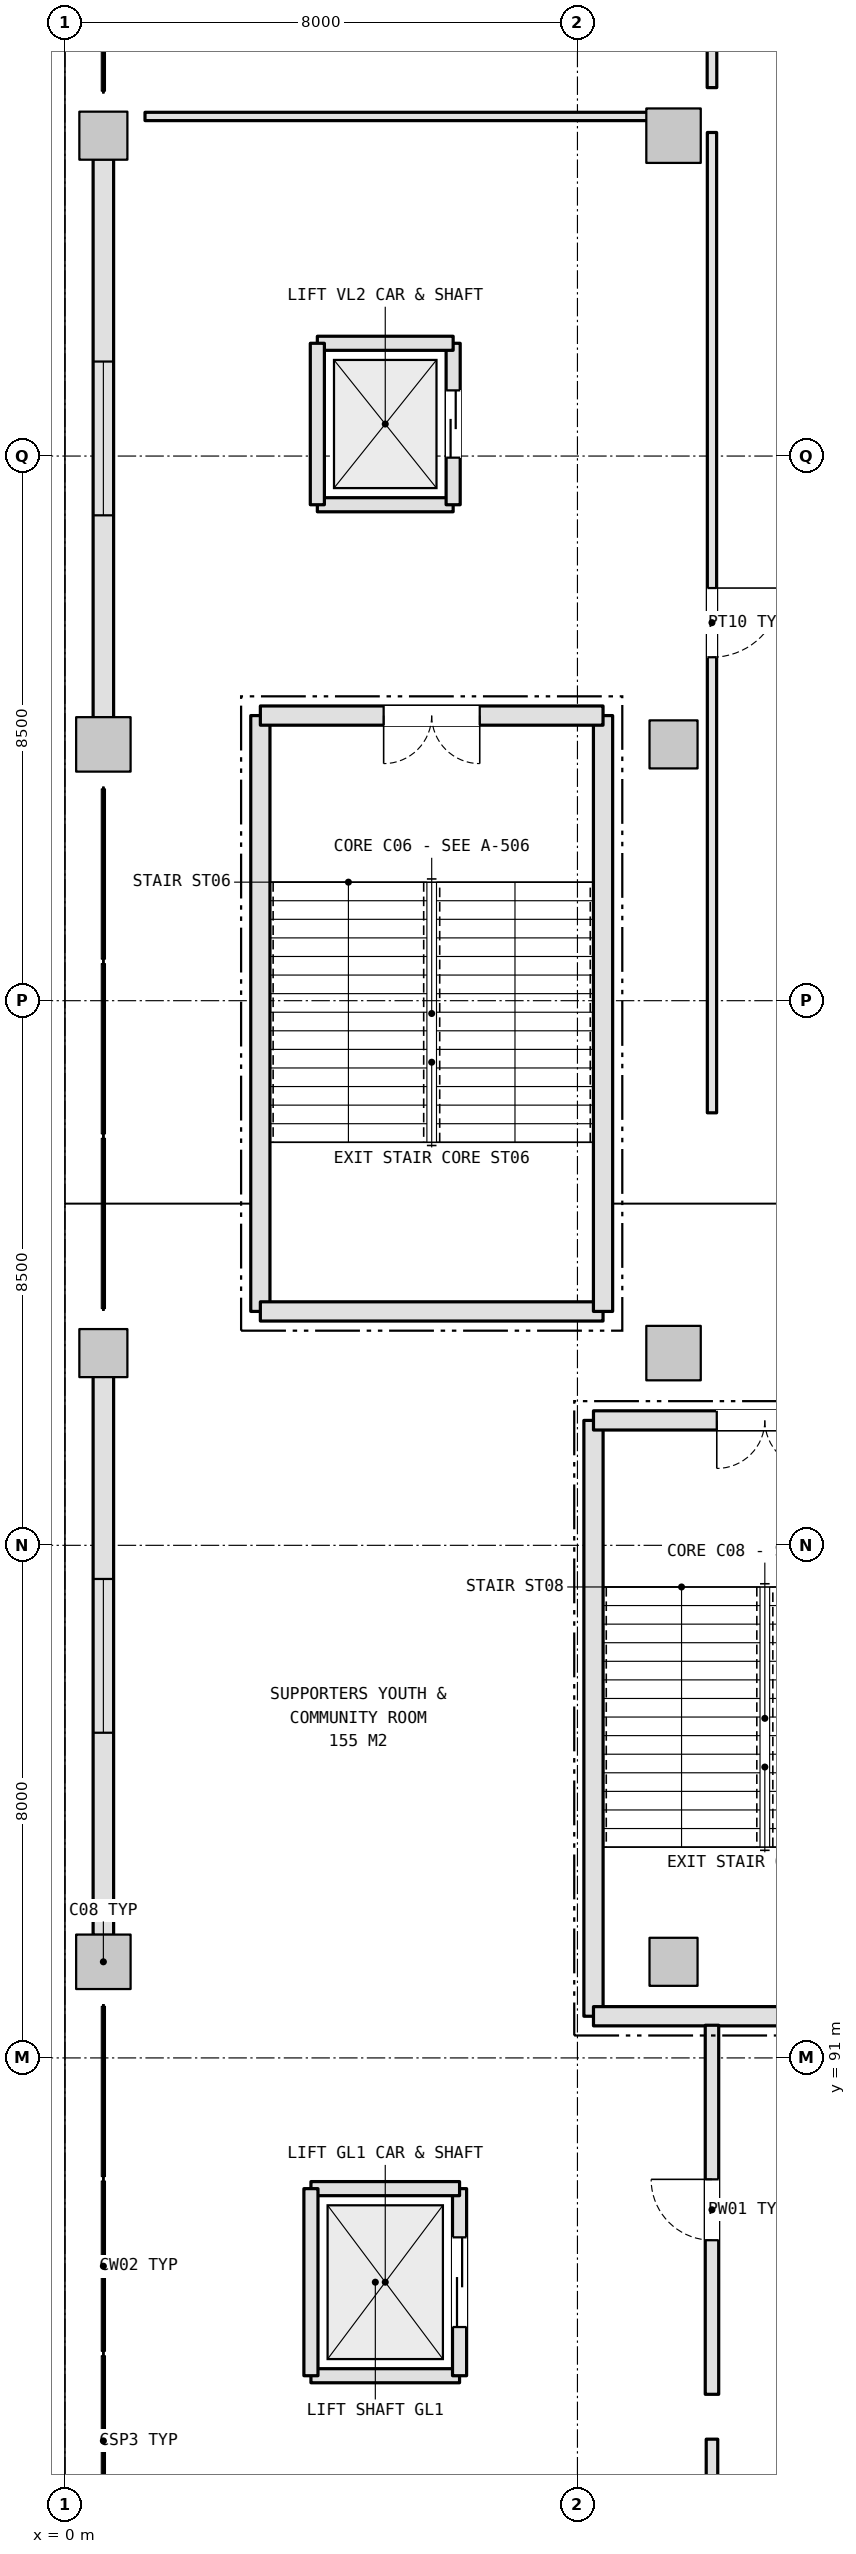
"""IFC4 building model, lengths in metres.
Left out: names, types, materials, properties, quantities, classifications, styles, units other than length and angle.
Written with IfcOpenShell. Run it as: python <this file> out.ifc"""

import sys

from ifc_helpers import new_model, si_unit, direction, frame, frame_2d, origin, origin_2d, place, context, subcontext, project, spatial, rectangle, extrude, element, fill, save


model = new_model("IFC4")
c1 = context("Model", 3, precision=1e-05, world=origin(), true_north=direction((0.0, 1.0)))
c2 = subcontext(c1, "Body", "Model", "MODEL_VIEW")
j1 = project(units=[si_unit("LENGTHUNIT", "METRE"), si_unit("PLANEANGLEUNIT", "RADIAN")], contexts=[c1])
p1 = place(None, origin())
s1 = spatial("IfcSite", under=j1, at=p1, CompositionType="ELEMENT")
p2 = place(p1, origin())
s2 = spatial("IfcBuilding", under=s1, at=p2, CompositionType="ELEMENT")
p3 = place(p2, frame((0.0, 0.0, 5.4)))
s3 = spatial("IfcBuildingStorey", under=s2, at=p3, CompositionType="ELEMENT", Elevation=5.4)
p4 = place(p3, frame((0.6, 92.5, 0.0), z_axis=(0.0, 0.0, 1.0), x_axis=(1.0, 0.0, 0.0)))
e1 = element("IfcColumn", 1, at=p4, inside=s3, PredefinedType="COLUMN", context=c2, shape_type="SweptSolid", body=[
    extrude(rectangle(XDim=0.85, YDim=0.85, at=origin_2d()), origin(), (0.0, 0.0, 1.0), 5.4),
])
p5 = place(p3, frame((0.6, 102.0, 0.0), z_axis=(0.0, 0.0, 1.0), x_axis=(1.0, 0.0, 0.0)))
e2 = element("IfcColumn", 2, at=p5, inside=s3, PredefinedType="COLUMN", context=c2, shape_type="SweptSolid", body=[
    extrude(rectangle(XDim=0.75, YDim=0.75, at=origin_2d()), origin(), (0.0, 0.0, 1.0), 5.4),
])
p6 = place(p3, frame((0.6, 111.5, 0.0), z_axis=(0.0, 0.0, 1.0), x_axis=(1.0, 0.0, 0.0)))
e3 = element("IfcColumn", 3, at=p6, inside=s3, PredefinedType="COLUMN", context=c2, shape_type="SweptSolid", body=[
    extrude(rectangle(XDim=0.85, YDim=0.85, at=origin_2d()), origin(), (0.0, 0.0, 1.0), 5.4),
])
for number, where, z_axis, x_axis in (
    (4, (0.6, 121.0, 0.0), (0.0, 0.0, 1.0), (1.0, 0.0, 0.0)),
    (5, (9.5, 92.5, 0.0), (0.0, 0.0, 1.0), (1.0, 0.0, 0.0)),
):
    element("IfcColumn", number, at=place(p3, frame(where, z_axis=z_axis, x_axis=x_axis)), inside=s3, PredefinedType="COLUMN", context=c2, shape_type="SweptSolid", body=[
        extrude(rectangle(XDim=0.75, YDim=0.75, at=origin_2d()), origin(), (0.0, 0.0, 1.0), 5.4),
    ])
p7 = place(p3, frame((9.5, 102.0, 0.0), z_axis=(0.0, 0.0, 1.0), x_axis=(1.0, 0.0, 0.0)))
e6 = element("IfcColumn", 6, at=p7, inside=s3, PredefinedType="COLUMN", context=c2, shape_type="SweptSolid", body=[
    extrude(rectangle(XDim=0.85, YDim=0.85, at=origin_2d()), origin(), (0.0, 0.0, 1.0), 5.4),
])
p8 = place(p3, frame((9.5, 111.5, 0.0), z_axis=(0.0, 0.0, 1.0), x_axis=(1.0, 0.0, 0.0)))
e7 = element("IfcColumn", 7, at=p8, inside=s3, PredefinedType="COLUMN", context=c2, shape_type="SweptSolid", body=[
    extrude(rectangle(XDim=0.75, YDim=0.75, at=origin_2d()), origin(), (0.0, 0.0, 1.0), 5.4),
])
p9 = place(p3, frame((9.5, 121.0, 0.0), z_axis=(0.0, 0.0, 1.0), x_axis=(1.0, 0.0, 0.0)))
e8 = element("IfcColumn", 8, at=p9, inside=s3, PredefinedType="COLUMN", context=c2, shape_type="SweptSolid", body=[
    extrude(rectangle(XDim=0.85, YDim=0.85, at=origin_2d()), origin(), (0.0, 0.0, 1.0), 5.4),
])
p10 = place(p3, frame((0.6, 92.913, 0.0), z_axis=(0.0, 0.0, 1.0), x_axis=(0.0, 1.0, 0.0)))
e9 = element("IfcWall", 9, at=p10, inside=s3, PredefinedType="SOLIDWALL", context=c2, shape_type="SweptSolid", body=[
    extrude(rectangle(XDim=8.724, YDim=0.32, at=frame_2d((4.362, 0.0))), origin(), (0.0, 0.0, 1.0), 4.475),
])
p11 = place(p10, frame((3.162, 0.0, 1.05)))
e10 = element("IfcOpeningElement", 10, at=p11, cuts=e9, PredefinedType="OPENING", context=c2, shape_type="SweptSolid", body=[
    extrude(rectangle(XDim=2.4, YDim=2.1, at=frame_2d((1.2, 1.05))), frame((0.0, 0.17, 0.0), z_axis=(0.0, -1.0, 0.0), x_axis=(1.0, 0.0, 0.0)), (0.0, 0.0, 1.0), 0.34),
])
p12 = place(p3, frame((0.6, 111.913, 0.0), z_axis=(0.0, 0.0, 1.0), x_axis=(0.0, 1.0, 0.0)))
e11 = element("IfcWall", 11, at=p12, inside=s3, PredefinedType="SOLIDWALL", context=c2, shape_type="SweptSolid", body=[
    extrude(rectangle(XDim=8.724, YDim=0.32, at=frame_2d((4.362, 0.0))), origin(), (0.0, 0.0, 1.0), 4.475),
])
p13 = place(p12, frame((3.162, 0.0, 1.05)))
e12 = element("IfcOpeningElement", 12, at=p13, cuts=e11, PredefinedType="OPENING", context=c2, shape_type="SweptSolid", body=[
    extrude(rectangle(XDim=2.4, YDim=2.1, at=frame_2d((1.2, 1.05))), frame((0.0, 0.17, 0.0), z_axis=(0.0, -1.0, 0.0), x_axis=(1.0, 0.0, 0.0)), (0.0, 0.0, 1.0), 0.34),
])
p14 = place(p3, frame((3.05, 111.95, 0.0), z_axis=(0.0, 0.0, 1.0), x_axis=(0.0, -1.0, 0.0)))
e13 = element("IfcWall", 13, at=p14, inside=s3, PredefinedType="SHEAR", context=c2, shape_type="SweptSolid", body=[
    extrude(rectangle(XDim=9.299, YDim=0.3, at=frame_2d((4.65, 0.0))), origin(), (0.0, 0.0, 1.0), 5.14),
])
p15 = place(p3, frame((3.05, 102.65, 0.0), z_axis=(0.0, 0.0, 1.0), x_axis=(1.0, 0.0, 0.0)))
e14 = element("IfcWall", 14, at=p15, inside=s3, PredefinedType="SHEAR", context=c2, shape_type="SweptSolid", body=[
    extrude(rectangle(XDim=5.349, YDim=0.3, at=frame_2d((2.675, 0.0))), origin(), (0.0, 0.0, 1.0), 5.14),
])
p16 = place(p3, frame((8.4, 102.65, 0.0), z_axis=(0.0, 0.0, 1.0), x_axis=(0.0, 1.0, 0.0)))
e15 = element("IfcWall", 15, at=p16, inside=s3, PredefinedType="SHEAR", context=c2, shape_type="SweptSolid", body=[
    extrude(rectangle(XDim=9.299, YDim=0.3, at=frame_2d((4.65, 0.0))), origin(), (0.0, 0.0, 1.0), 5.14),
])
p17 = place(p3, frame((8.4, 111.95, 0.0), z_axis=(0.0, 0.0, 1.0), x_axis=(-1.0, 0.0, 0.0)))
e16 = element("IfcWall", 16, at=p17, inside=s3, PredefinedType="SHEAR", context=c2, shape_type="SweptSolid", body=[
    extrude(rectangle(XDim=5.349, YDim=0.3, at=frame_2d((2.675, 0.0))), origin(), (0.0, 0.0, 1.0), 5.14),
])
p18 = place(p17, frame((1.925, 0.0, 0.0)))
e17 = element("IfcOpeningElement", 17, at=p18, cuts=e16, PredefinedType="OPENING", context=c2, shape_type="SweptSolid", body=[
    extrude(rectangle(XDim=1.5, YDim=2.2, at=frame_2d((0.75, 1.1))), frame((0.0, 0.16, 0.0), z_axis=(0.0, -1.0, 0.0), x_axis=(1.0, 0.0, 0.0)), (0.0, 0.0, 1.0), 0.32),
])
p19 = place(p3, frame((8.25, 100.95, 0.0), z_axis=(0.0, 0.0, 1.0), x_axis=(0.0, -1.0, 0.0)))
e18 = element("IfcWall", 18, at=p19, inside=s3, PredefinedType="SHEAR", context=c2, shape_type="SweptSolid", body=[
    extrude(rectangle(XDim=9.299, YDim=0.3, at=frame_2d((4.65, 0.0))), origin(), (0.0, 0.0, 1.0), 5.14),
])
p20 = place(p3, frame((8.25, 91.65, 0.0), z_axis=(0.0, 0.0, 1.0), x_axis=(1.0, 0.0, 0.0)))
e19 = element("IfcWall", 19, at=p20, inside=s3, PredefinedType="SHEAR", context=c2, shape_type="SweptSolid", body=[
    extrude(rectangle(XDim=5.349, YDim=0.3, at=frame_2d((2.675, 0.0))), origin(), (0.0, 0.0, 1.0), 5.14),
])
p21 = place(p3, frame((13.6, 100.95, 0.0), z_axis=(0.0, 0.0, 1.0), x_axis=(-1.0, 0.0, 0.0)))
e20 = element("IfcWall", 20, at=p21, inside=s3, PredefinedType="SHEAR", context=c2, shape_type="SweptSolid", body=[
    extrude(rectangle(XDim=5.349, YDim=0.3, at=frame_2d((2.675, 0.0))), origin(), (0.0, 0.0, 1.0), 5.14),
])
p22 = place(p21, frame((1.925, 0.0, 0.0)))
e21 = element("IfcOpeningElement", 21, at=p22, cuts=e20, PredefinedType="OPENING", context=c2, shape_type="SweptSolid", body=[
    extrude(rectangle(XDim=1.5, YDim=2.2, at=frame_2d((0.75, 1.1))), frame((0.0, 0.16, 0.0), z_axis=(0.0, -1.0, 0.0), x_axis=(1.0, 0.0, 0.0)), (0.0, 0.0, 1.0), 0.32),
])
p23 = place(p3, frame((3.94, 115.24, 0.0), z_axis=(0.0, 0.0, 1.0), x_axis=(1.0, 0.0, 0.0)))
e22 = element("IfcWall", 22, at=p23, inside=s3, PredefinedType="SHEAR", context=c2, shape_type="SweptSolid", body=[
    extrude(rectangle(XDim=2.12, YDim=0.22, at=frame_2d((1.06, 0.0))), origin(), (0.0, 0.0, 1.0), 5.14),
])
p24 = place(p3, frame((6.06, 115.24, 0.0), z_axis=(0.0, 0.0, 1.0), x_axis=(0.0, 1.0, 0.0)))
e23 = element("IfcWall", 23, at=p24, inside=s3, PredefinedType="SHEAR", context=c2, shape_type="SweptSolid", body=[
    extrude(rectangle(XDim=2.52, YDim=0.22, at=frame_2d((1.26, 0.0))), origin(), (0.0, 0.0, 1.0), 5.14),
])
p25 = place(p24, frame((0.735, 0.0, 0.0)))
e24 = element("IfcOpeningElement", 24, at=p25, cuts=e23, PredefinedType="OPENING", context=c2, shape_type="SweptSolid", body=[
    extrude(rectangle(XDim=1.05, YDim=2.15, at=frame_2d((0.525, 1.075))), frame((0.0, 0.12, 0.0), z_axis=(0.0, -1.0, 0.0), x_axis=(1.0, 0.0, 0.0)), (0.0, 0.0, 1.0), 0.24),
])
p26 = place(p3, frame((6.06, 117.76, 0.0), z_axis=(0.0, 0.0, 1.0), x_axis=(-1.0, 0.0, 0.0)))
e25 = element("IfcWall", 25, at=p26, inside=s3, PredefinedType="SHEAR", context=c2, shape_type="SweptSolid", body=[
    extrude(rectangle(XDim=2.12, YDim=0.22, at=frame_2d((1.06, 0.0))), origin(), (0.0, 0.0, 1.0), 5.14),
])
p27 = place(p3, frame((3.94, 117.76, 0.0), z_axis=(0.0, 0.0, 1.0), x_axis=(0.0, -1.0, 0.0)))
e26 = element("IfcWall", 26, at=p27, inside=s3, PredefinedType="SHEAR", context=c2, shape_type="SweptSolid", body=[
    extrude(rectangle(XDim=2.52, YDim=0.22, at=frame_2d((1.26, 0.0))), origin(), (0.0, 0.0, 1.0), 5.14),
])
p28 = place(p3, frame((3.84, 86.04, 0.0), z_axis=(0.0, 0.0, 1.0), x_axis=(1.0, 0.0, 0.0)))
e27 = element("IfcWall", 27, at=p28, inside=s3, PredefinedType="SHEAR", context=c2, shape_type="SweptSolid", body=[
    extrude(rectangle(XDim=2.32, YDim=0.22, at=frame_2d((1.16, 0.0))), origin(), (0.0, 0.0, 1.0), 5.14),
])
p29 = place(p3, frame((6.16, 86.04, 0.0), z_axis=(0.0, 0.0, 1.0), x_axis=(0.0, 1.0, 0.0)))
e28 = element("IfcWall", 28, at=p29, inside=s3, PredefinedType="SHEAR", context=c2, shape_type="SweptSolid", body=[
    extrude(rectangle(XDim=2.92, YDim=0.22, at=frame_2d((1.46, 0.0))), origin(), (0.0, 0.0, 1.0), 5.14),
])
p30 = place(p29, frame((0.76, 0.0, 0.0)))
e29 = element("IfcOpeningElement", 29, at=p30, cuts=e28, PredefinedType="OPENING", context=c2, shape_type="SweptSolid", body=[
    extrude(rectangle(XDim=1.4, YDim=2.3, at=frame_2d((0.7, 1.15))), frame((0.0, 0.12, 0.0), z_axis=(0.0, -1.0, 0.0), x_axis=(1.0, 0.0, 0.0)), (0.0, 0.0, 1.0), 0.24),
])
p31 = place(p3, frame((6.16, 88.96, 0.0), z_axis=(0.0, 0.0, 1.0), x_axis=(-1.0, 0.0, 0.0)))
e30 = element("IfcWall", 30, at=p31, inside=s3, PredefinedType="SHEAR", context=c2, shape_type="SweptSolid", body=[
    extrude(rectangle(XDim=2.32, YDim=0.22, at=frame_2d((1.16, 0.0))), origin(), (0.0, 0.0, 1.0), 5.14),
])
p32 = place(p3, frame((3.84, 88.96, 0.0), z_axis=(0.0, 0.0, 1.0), x_axis=(0.0, -1.0, 0.0)))
e31 = element("IfcWall", 31, at=p32, inside=s3, PredefinedType="SHEAR", context=c2, shape_type="SweptSolid", body=[
    extrude(rectangle(XDim=2.92, YDim=0.22, at=frame_2d((1.46, 0.0))), origin(), (0.0, 0.0, 1.0), 5.14),
])
p33 = place(p3, frame((10.1, 85.05, 0.0), z_axis=(0.0, 0.0, 1.0), x_axis=(0.0, -1.0, 0.0)))
e32 = element("IfcWall", 32, at=p33, inside=s3, PredefinedType="PARTITIONING", context=c2, shape_type="SweptSolid", body=[
    extrude(rectangle(XDim=15.3, YDim=0.18, at=frame_2d((7.65, 0.0))), origin(), (0.0, 0.0, 1.0), 4.668),
])
p34 = place(p33, frame((7.17, 0.0, 0.0)))
e33 = element("IfcOpeningElement", 33, at=p34, cuts=e32, PredefinedType="OPENING", context=c2, shape_type="SweptSolid", body=[
    extrude(rectangle(XDim=0.96, YDim=2.15, at=frame_2d((0.48, 1.075))), frame((0.0, 0.1, 0.0), z_axis=(0.0, -1.0, 0.0), x_axis=(1.0, 0.0, 0.0)), (0.0, 0.0, 1.0), 0.2),
])
p35 = place(p3, frame((10.1, 91.51, 0.0), z_axis=(0.0, 0.0, 1.0), x_axis=(0.0, -1.0, 0.0)))
e34 = element("IfcWall", 34, at=p35, inside=s3, PredefinedType="PLUMBINGWALL", context=c2, shape_type="SweptSolid", body=[
    extrude(rectangle(XDim=5.76, YDim=0.21, at=frame_2d((2.88, 0.0))), origin(), (0.0, 0.0, 1.0), 5.12),
])
p36 = place(p35, frame((2.405, 0.0, 0.0)))
e35 = element("IfcOpeningElement", 35, at=p36, cuts=e34, PredefinedType="OPENING", context=c2, shape_type="SweptSolid", body=[
    extrude(rectangle(XDim=0.95, YDim=2.15, at=frame_2d((0.475, 1.075))), frame((0.0, 0.115, 0.0), z_axis=(0.0, -1.0, 0.0), x_axis=(1.0, 0.0, 0.0)), (0.0, 0.0, 1.0), 0.23),
])
p37 = place(p3, frame((10.1, 121.05, 0.0), z_axis=(0.0, 0.0, 1.0), x_axis=(0.0, -1.0, 0.0)))
e36 = element("IfcWall", 36, at=p37, inside=s3, PredefinedType="PARTITIONING", context=c2, shape_type="SweptSolid", body=[
    extrude(rectangle(XDim=15.3, YDim=0.145, at=frame_2d((7.65, 0.0))), origin(), (0.0, 0.0, 1.0), 4.668),
])
p38 = place(p37, frame((7.11, 0.0, 0.0)))
e37 = element("IfcOpeningElement", 37, at=p38, cuts=e36, PredefinedType="OPENING", context=c2, shape_type="SweptSolid", body=[
    extrude(rectangle(XDim=1.08, YDim=2.25, at=frame_2d((0.54, 1.125))), frame((0.0, 0.083, 0.0), z_axis=(0.0, -1.0, 0.0), x_axis=(1.0, 0.0, 0.0)), (0.0, 0.0, 1.0), 0.165),
])
p39 = place(p3, frame((1.25, 121.3, 0.0), z_axis=(0.0, 0.0, 1.0), x_axis=(1.0, 0.0, 0.0)))
e38 = element("IfcWall", 38, at=p39, inside=s3, PredefinedType="PARTITIONING", context=c2, shape_type="SweptSolid", body=[
    extrude(rectangle(XDim=8.4, YDim=0.13, at=frame_2d((4.2, 0.0))), origin(), (0.0, 0.0, 1.0), 4.475),
])
p40 = place(p3, frame((10.1, 130.05, 0.0), z_axis=(0.0, 0.0, 1.0), x_axis=(0.0, -1.0, 0.0)))
e39 = element("IfcWall", 39, at=p40, inside=s3, PredefinedType="PARTITIONING", context=c2, shape_type="SweptSolid", body=[
    extrude(rectangle(XDim=8.3, YDim=0.15, at=frame_2d((4.15, 0.0))), origin(), (0.0, 0.0, 1.0), 4.668),
])
p41 = place(p40, frame((2.175, 0.0, 0.0)))
e40 = element("IfcOpeningElement", 40, at=p41, cuts=e39, PredefinedType="OPENING", context=c2, shape_type="SweptSolid", body=[
    extrude(rectangle(XDim=1.55, YDim=2.15, at=frame_2d((0.775, 1.075))), frame((0.0, 0.085, 0.0), z_axis=(0.0, -1.0, 0.0), x_axis=(1.0, 0.0, 0.0)), (0.0, 0.0, 1.0), 0.17),
])
p42 = place(p11, origin())
e41 = element("IfcWindow", 41, at=p42, inside=s3, PartitioningType="SINGLE_PANEL", PredefinedType="WINDOW", context=c2, shape_type="SweptSolid", body=[
    extrude(rectangle(XDim=2.4, YDim=2.1, at=frame_2d((1.2, 1.05))), frame((0.0, 0.03, 0.0), z_axis=(0.0, -1.0, 0.0), x_axis=(1.0, 0.0, 0.0)), (0.0, 0.0, 1.0), 0.06),
])
fill(e10, e41)
p43 = place(p13, origin())
e42 = element("IfcWindow", 42, at=p43, inside=s3, PartitioningType="SINGLE_PANEL", PredefinedType="WINDOW", context=c2, shape_type="SweptSolid", body=[
    extrude(rectangle(XDim=2.4, YDim=2.1, at=frame_2d((1.2, 1.05))), frame((0.0, 0.03, 0.0), z_axis=(0.0, -1.0, 0.0), x_axis=(1.0, 0.0, 0.0)), (0.0, 0.0, 1.0), 0.06),
])
fill(e12, e42)
p44 = place(p18, origin())
e43 = element("IfcDoor", 43, at=p44, inside=s3, OperationType="DOUBLE_DOOR_SINGLE_SWING", PredefinedType="DOOR", context=c2, shape_type="SweptSolid", body=[
    extrude(rectangle(XDim=1.5, YDim=2.2, at=frame_2d((0.75, 1.1))), frame((0.0, 0.025, 0.0), z_axis=(0.0, -1.0, 0.0), x_axis=(1.0, 0.0, 0.0)), (0.0, 0.0, 1.0), 0.05),
])
fill(e17, e43)
p45 = place(p22, origin())
e44 = element("IfcDoor", 44, at=p45, inside=s3, OperationType="DOUBLE_DOOR_SINGLE_SWING", PredefinedType="DOOR", context=c2, shape_type="SweptSolid", body=[
    extrude(rectangle(XDim=1.5, YDim=2.2, at=frame_2d((0.75, 1.1))), frame((0.0, 0.025, 0.0), z_axis=(0.0, -1.0, 0.0), x_axis=(1.0, 0.0, 0.0)), (0.0, 0.0, 1.0), 0.05),
])
fill(e21, e44)
p46 = place(p25, origin())
e45 = element("IfcDoor", 45, at=p46, inside=s3, OperationType="DOUBLE_DOOR_SLIDING", PredefinedType="DOOR", context=c2, shape_type="SweptSolid", body=[
    extrude(rectangle(XDim=1.05, YDim=2.15, at=frame_2d((0.525, 1.075))), frame((0.0, 0.025, 0.0), z_axis=(0.0, -1.0, 0.0), x_axis=(1.0, 0.0, 0.0)), (0.0, 0.0, 1.0), 0.05),
])
fill(e24, e45)
p47 = place(p30, origin())
e46 = element("IfcDoor", 46, at=p47, inside=s3, OperationType="DOUBLE_DOOR_SLIDING", PredefinedType="DOOR", context=c2, shape_type="SweptSolid", body=[
    extrude(rectangle(XDim=1.4, YDim=2.3, at=frame_2d((0.7, 1.15))), frame((0.0, 0.025, 0.0), z_axis=(0.0, -1.0, 0.0), x_axis=(1.0, 0.0, 0.0)), (0.0, 0.0, 1.0), 0.05),
])
fill(e29, e46)
p48 = place(p36, frame((0.95, 0.0, 0.0), z_axis=(0.0, 0.0, 1.0), x_axis=(-1.0, 0.0, 0.0)))
e47 = element("IfcDoor", 47, at=p48, inside=s3, OperationType="SINGLE_SWING_LEFT", PredefinedType="DOOR", context=c2, shape_type="SweptSolid", body=[
    extrude(rectangle(XDim=0.95, YDim=2.15, at=frame_2d((0.475, 1.075))), frame((0.0, 0.025, 0.0), z_axis=(0.0, -1.0, 0.0), x_axis=(1.0, 0.0, 0.0)), (0.0, 0.0, 1.0), 0.05),
])
fill(e35, e47)
p49 = place(p38, origin())
e48 = element("IfcDoor", 48, at=p49, inside=s3, OperationType="SINGLE_SWING_LEFT", PredefinedType="DOOR", context=c2, shape_type="SweptSolid", body=[
    extrude(rectangle(XDim=1.08, YDim=2.25, at=frame_2d((0.54, 1.125))), frame((0.0, 0.025, 0.0), z_axis=(0.0, -1.0, 0.0), x_axis=(1.0, 0.0, 0.0)), (0.0, 0.0, 1.0), 0.05),
])
fill(e37, e48)
save(model, sys.argv[1])
